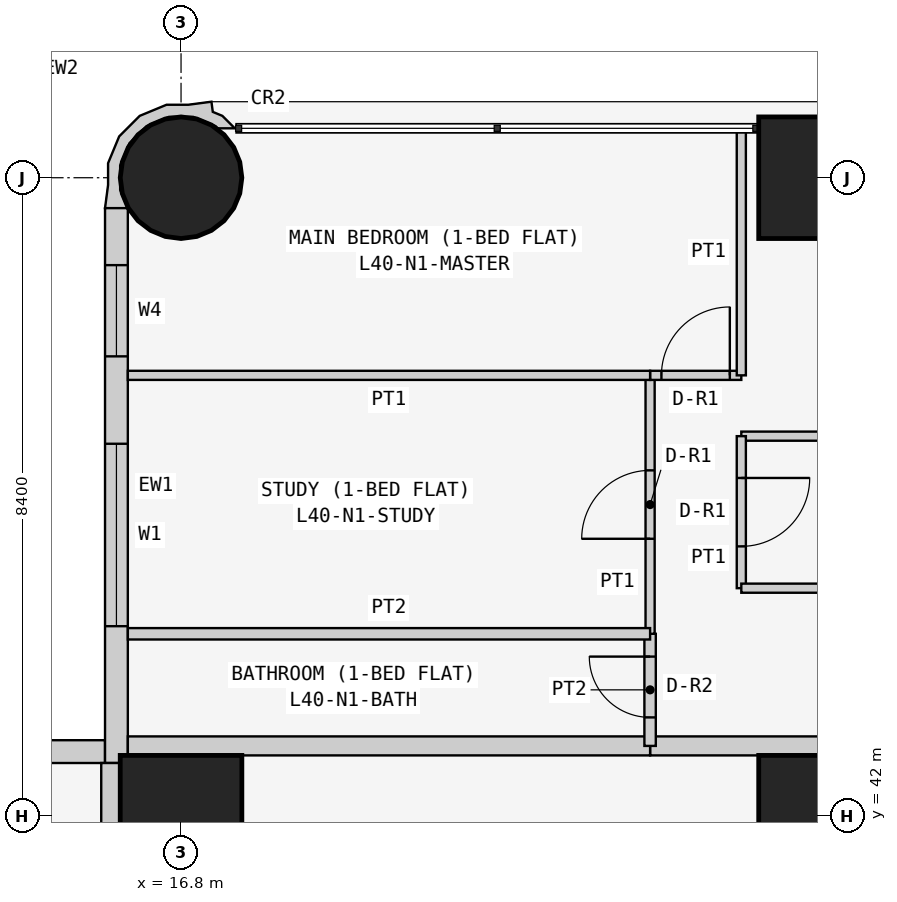
"""IFC4 building model, lengths in metres.
Left out: names, types, materials, properties, quantities, classifications, styles, units other than length and angle.
Written with IfcOpenShell. Run it as: python <this file> out.ifc"""

import sys

from ifc_helpers import new_model, si_unit, direction, frame, frame_2d, origin, origin_2d, place, context, subcontext, project, spatial, polyline, rectangle, circle, outline, extrude, element, fill, save


model = new_model("IFC4")
c1 = context("Model", 3, precision=1e-05, world=origin(), true_north=direction((0.0, 1.0)))
c2 = subcontext(c1, "Body", "Model", "MODEL_VIEW")
j1 = project(units=[si_unit("LENGTHUNIT", "METRE"), si_unit("PLANEANGLEUNIT", "RADIAN")], contexts=[c1])
p1 = place(None, origin())
s1 = spatial("IfcSite", under=j1, at=p1, CompositionType="ELEMENT")
p2 = place(p1, origin())
s2 = spatial("IfcBuilding", under=s1, at=p2, CompositionType="ELEMENT")
p3 = place(p2, frame((0.0, 0.0, 155.7)))
s3 = spatial("IfcBuildingStorey", under=s2, at=p3, CompositionType="ELEMENT", Elevation=155.7)
p4 = place(p3, frame((16.8, 42.0, 0.0), z_axis=(0.0, 0.0, 1.0), x_axis=(1.0, 0.0, 0.0)))
e1 = element("IfcColumn", 1, at=p4, inside=s3, PredefinedType="COLUMN", context=c2, shape_type="SweptSolid", body=[
    extrude(rectangle(XDim=1.6, YDim=1.6, at=origin_2d()), origin(), (0.0, 0.0, 1.0), 3.6),
])
p5 = place(p3, frame((16.8, 50.4, 0.0), z_axis=(0.0, 0.0, 1.0), x_axis=(1.0, 0.0, 0.0)))
e2 = element("IfcColumn", 2, at=p5, inside=s3, PredefinedType="COLUMN", context=c2, shape_type="SweptSolid", body=[
    extrude(circle(Radius=0.8, at=origin_2d()), origin(), (0.0, 0.0, 1.0), 3.6),
])
for number, where, z_axis, x_axis in (
    (3, (25.2, 42.0, 0.0), (0.0, 0.0, 1.0), (1.0, 0.0, 0.0)),
    (4, (25.2, 50.4, 0.0), (0.0, 0.0, 1.0), (1.0, 0.0, 0.0)),
):
    element("IfcColumn", number, at=place(p3, frame(where, z_axis=z_axis, x_axis=x_axis)), inside=s3, PredefinedType="COLUMN", context=c2, shape_type="SweptSolid", body=[
        extrude(rectangle(XDim=1.6, YDim=1.6, at=origin_2d()), origin(), (0.0, 0.0, 1.0), 3.6),
    ])
p6 = place(p3, frame((15.8, 42.85, 0.0), z_axis=(0.0, 0.0, 1.0), x_axis=(-1.0, 0.0, 0.0)))
e5 = element("IfcWall", 5, at=p6, inside=s3, PredefinedType="SOLIDWALL", context=c2, shape_type="SweptSolid", body=[
    extrude(rectangle(XDim=15.4, YDim=0.3, at=frame_2d((7.7, 0.0))), origin(), (0.0, 0.0, 1.0), 3.45),
])
p7 = place(p6, frame((1.2, 0.0, 0.9)))
e6 = element("IfcOpeningElement", 6, at=p7, cuts=e5, PredefinedType="OPENING", context=c2, shape_type="SweptSolid", body=[
    extrude(rectangle(XDim=1.8, YDim=1.5, at=frame_2d((0.9, 0.75))), frame((0.0, 0.16, 0.0), z_axis=(0.0, -1.0, 0.0), x_axis=(1.0, 0.0, 0.0)), (0.0, 0.0, 1.0), 0.32),
])
p8 = place(p6, frame((4.95, 0.0, 1.5)))
e7 = element("IfcOpeningElement", 7, at=p8, cuts=e5, PredefinedType="OPENING", context=c2, shape_type="SweptSolid", body=[
    extrude(rectangle(XDim=0.9, YDim=0.7, at=frame_2d((0.45, 0.35))), frame((0.0, 0.16, 0.0), z_axis=(0.0, -1.0, 0.0), x_axis=(1.0, 0.0, 0.0)), (0.0, 0.0, 1.0), 0.32),
])
p9 = place(p6, frame((8.5, 0.0, 0.9)))
e8 = element("IfcOpeningElement", 8, at=p9, cuts=e5, PredefinedType="OPENING", context=c2, shape_type="SweptSolid", body=[
    extrude(rectangle(XDim=1.8, YDim=1.5, at=frame_2d((0.9, 0.75))), frame((0.0, 0.16, 0.0), z_axis=(0.0, -1.0, 0.0), x_axis=(1.0, 0.0, 0.0)), (0.0, 0.0, 1.0), 0.32),
])
p10 = place(p6, frame((12.5, 0.0, 0.0)))
e9 = element("IfcOpeningElement", 9, at=p10, cuts=e5, PredefinedType="OPENING", context=c2, shape_type="SweptSolid", body=[
    extrude(rectangle(XDim=0.9, YDim=2.4, at=frame_2d((0.45, 1.2))), frame((0.0, 0.16, 0.0), z_axis=(0.0, -1.0, 0.0), x_axis=(1.0, 0.0, 0.0)), (0.0, 0.0, 1.0), 0.32),
])
p11 = place(p6, frame((13.5, 0.0, 0.9)))
e10 = element("IfcOpeningElement", 10, at=p11, cuts=e5, PredefinedType="OPENING", context=c2, shape_type="SweptSolid", body=[
    extrude(rectangle(XDim=1.2, YDim=1.5, at=frame_2d((0.6, 0.75))), frame((0.0, 0.16, 0.0), z_axis=(0.0, -1.0, 0.0), x_axis=(1.0, 0.0, 0.0)), (0.0, 0.0, 1.0), 0.32),
])
p12 = place(p3, frame((15.95, 50.0, 0.0), z_axis=(0.0, 0.0, 1.0), x_axis=(0.0, -1.0, 0.0)))
e11 = element("IfcWall", 11, at=p12, inside=s3, PredefinedType="SOLIDWALL", context=c2, shape_type="SweptSolid", body=[
    extrude(rectangle(XDim=7.3, YDim=0.3, at=frame_2d((3.65, 0.0))), origin(), (0.0, 0.0, 1.0), 3.45),
])
p13 = place(p12, frame((3.1, 0.0, 0.9)))
e12 = element("IfcOpeningElement", 12, at=p13, cuts=e11, PredefinedType="OPENING", context=c2, shape_type="SweptSolid", body=[
    extrude(rectangle(XDim=2.4, YDim=1.5, at=frame_2d((1.2, 0.75))), frame((0.0, 0.16, 0.0), z_axis=(0.0, -1.0, 0.0), x_axis=(1.0, 0.0, 0.0)), (0.0, 0.0, 1.0), 0.32),
])
p14 = place(p12, frame((0.75, 0.0, 0.9)))
e13 = element("IfcOpeningElement", 13, at=p14, cuts=e11, PredefinedType="OPENING", context=c2, shape_type="SweptSolid", body=[
    extrude(rectangle(XDim=1.2, YDim=1.5, at=frame_2d((0.6, 0.75))), frame((0.0, 0.16, 0.0), z_axis=(0.0, -1.0, 0.0), x_axis=(1.0, 0.0, 0.0)), (0.0, 0.0, 1.0), 0.32),
])
p15 = place(p3, frame((17.448, 50.995, 0.0), z_axis=(0.0, 0.0, 1.0), x_axis=(-0.343276641956, 0.93923434088, 0.0)))
e14 = element("IfcWall", 14, at=p15, inside=s3, PredefinedType="SOLIDWALL", context=c2, shape_type="SweptSolid", body=[
    extrude(outline(polyline([(0.241, 0.023), (0.333, 0.124), (0.465, 0.094), (0.532, 0.393), (0.631, 0.663), (0.614, 1.045), (0.454, 1.391), (0.172, 1.649), (-0.098, 1.748), (-0.369, 1.89), (-0.509, 1.621), (-0.491, 1.615), (-0.479, 1.609), (-0.211, 1.62), (0.088, 1.511), (0.323, 1.295), (0.457, 1.006), (0.47, 0.688), (0.361, 0.389), (0.145, 0.154), (0.108, 0.137), (0.031, -0.075), (0.241, 0.023)])), origin(), (0.0, 0.0, 1.0), 3.45),
])
p16 = place(p3, frame((22.971, 42.925, 0.0), z_axis=(0.0, 0.0, 1.0), x_axis=(1.0, 0.0, 0.0)))
e15 = element("IfcWall", 15, at=p16, inside=s3, PredefinedType="PARTITIONING", context=c2, shape_type="SweptSolid", body=[
    extrude(rectangle(XDim=6.429, YDim=0.25, at=frame_2d((3.214, 0.0))), origin(), (0.0, 0.0, 1.0), 3.45),
])
p17 = place(p16, frame((4.929, 0.0, 0.0)))
e16 = element("IfcOpeningElement", 16, at=p17, cuts=e15, PredefinedType="OPENING", context=c2, shape_type="SweptSolid", body=[
    extrude(rectangle(XDim=1.0, YDim=2.1, at=frame_2d((0.5, 1.05))), frame((0.0, 0.135, 0.0), z_axis=(0.0, -1.0, 0.0), x_axis=(1.0, 0.0, 0.0)), (0.0, 0.0, 1.0), 0.27),
])
for number, where, z_axis, x_axis in (
    (17, (16.1, 42.925, 0.0), (0.0, 0.0, 1.0), (1.0, 0.0, 0.0)),
    (18, (15.875, 35.829, 0.0), (0.0, 0.0, 1.0), (0.0, 1.0, 0.0)),
):
    element("IfcWall", number, at=place(p3, frame(where, z_axis=z_axis, x_axis=x_axis)), inside=s3, PredefinedType="PARTITIONING", context=c2, shape_type="SweptSolid", body=[
        extrude(rectangle(XDim=6.871, YDim=0.25, at=frame_2d((3.436, 0.0))), origin(), (0.0, 0.0, 1.0), 3.45),
    ])
p18 = place(p3, frame((29.4, 47.0, 0.0), z_axis=(0.0, 0.0, 1.0), x_axis=(-1.0, 0.0, 0.0)))
e19 = element("IfcWall", 19, at=p18, inside=s3, PredefinedType="PARTITIONING", context=c2, shape_type="SweptSolid", body=[
    extrude(rectangle(XDim=5.229, YDim=0.12, at=frame_2d((2.615, 0.0))), origin(), (0.0, 0.0, 1.0), 3.45),
])
p19 = place(p3, frame((24.171, 47.0, 0.0), z_axis=(0.0, 0.0, 1.0), x_axis=(0.0, -1.0, 0.0)))
e20 = element("IfcWall", 20, at=p19, inside=s3, PredefinedType="PARTITIONING", context=c2, shape_type="SweptSolid", body=[
    extrude(rectangle(XDim=2.0, YDim=0.12, at=frame_2d((1.0, 0.0))), origin(), (0.0, 0.0, 1.0), 3.45),
])
p20 = place(p19, frame((0.55, 0.0, 0.0)))
e21 = element("IfcOpeningElement", 21, at=p20, cuts=e20, PredefinedType="OPENING", context=c2, shape_type="SweptSolid", body=[
    extrude(rectangle(XDim=0.9, YDim=2.1, at=frame_2d((0.45, 1.05))), frame((0.0, 0.07, 0.0), z_axis=(0.0, -1.0, 0.0), x_axis=(1.0, 0.0, 0.0)), (0.0, 0.0, 1.0), 0.14),
])
p21 = place(p3, frame((24.171, 45.0, 0.0), z_axis=(0.0, 0.0, 1.0), x_axis=(1.0, 0.0, 0.0)))
e22 = element("IfcWall", 22, at=p21, inside=s3, PredefinedType="PARTITIONING", context=c2, shape_type="SweptSolid", body=[
    extrude(rectangle(XDim=5.229, YDim=0.12, at=frame_2d((2.615, 0.0))), origin(), (0.0, 0.0, 1.0), 3.45),
])
p22 = place(p3, frame((22.971, 42.925, 0.0), z_axis=(0.0, 0.0, 1.0), x_axis=(0.0, 1.0, 0.0)))
e23 = element("IfcWall", 23, at=p22, inside=s3, PredefinedType="PARTITIONING", context=c2, shape_type="SweptSolid", body=[
    extrude(rectangle(XDim=1.475, YDim=0.15, at=frame_2d((0.737, 0.0))), origin(), (0.0, 0.0, 1.0), 3.45),
])
p23 = place(p22, frame((0.375, 0.0, 0.0)))
e24 = element("IfcOpeningElement", 24, at=p23, cuts=e23, PredefinedType="OPENING", context=c2, shape_type="SweptSolid", body=[
    extrude(rectangle(XDim=0.8, YDim=2.1, at=frame_2d((0.4, 1.05))), frame((0.0, 0.085, 0.0), z_axis=(0.0, -1.0, 0.0), x_axis=(1.0, 0.0, 0.0)), (0.0, 0.0, 1.0), 0.17),
])
p24 = place(p3, frame((22.971, 44.4, 0.0), z_axis=(0.0, 0.0, 1.0), x_axis=(0.0, 1.0, 0.0)))
e25 = element("IfcWall", 25, at=p24, inside=s3, PredefinedType="PARTITIONING", context=c2, shape_type="SweptSolid", body=[
    extrude(rectangle(XDim=3.4, YDim=0.12, at=frame_2d((1.7, 0.0))), origin(), (0.0, 0.0, 1.0), 3.45),
])
p25 = place(p24, frame((1.25, 0.0, 0.0)))
e26 = element("IfcOpeningElement", 26, at=p25, cuts=e25, PredefinedType="OPENING", context=c2, shape_type="SweptSolid", body=[
    extrude(rectangle(XDim=0.9, YDim=2.1, at=frame_2d((0.45, 1.05))), frame((0.0, 0.07, 0.0), z_axis=(0.0, -1.0, 0.0), x_axis=(1.0, 0.0, 0.0)), (0.0, 0.0, 1.0), 0.14),
])
p26 = place(p3, frame((22.971, 47.8, 0.0), z_axis=(0.0, 0.0, 1.0), x_axis=(1.0, 0.0, 0.0)))
e27 = element("IfcWall", 27, at=p26, inside=s3, PredefinedType="PARTITIONING", context=c2, shape_type="SweptSolid", body=[
    extrude(rectangle(XDim=1.2, YDim=0.12, at=frame_2d((0.6, 0.0))), origin(), (0.0, 0.0, 1.0), 3.45),
])
p27 = place(p26, frame((0.149, 0.0, 0.0)))
e28 = element("IfcOpeningElement", 28, at=p27, cuts=e27, PredefinedType="OPENING", context=c2, shape_type="SweptSolid", body=[
    extrude(rectangle(XDim=0.9, YDim=2.1, at=frame_2d((0.45, 1.05))), frame((0.0, 0.07, 0.0), z_axis=(0.0, -1.0, 0.0), x_axis=(1.0, 0.0, 0.0)), (0.0, 0.0, 1.0), 0.14),
])
p28 = place(p3, frame((24.171, 47.8, 0.0), z_axis=(0.0, 0.0, 1.0), x_axis=(0.0, 1.0, 0.0)))
e29 = element("IfcWall", 29, at=p28, inside=s3, PredefinedType="PARTITIONING", context=c2, shape_type="SweptSolid", body=[
    extrude(rectangle(XDim=3.25, YDim=0.12, at=frame_2d((1.625, 0.0))), origin(), (0.0, 0.0, 1.0), 3.45),
])
p29 = place(p3, frame((22.971, 44.4, 0.0), z_axis=(0.0, 0.0, 1.0), x_axis=(-1.0, 0.0, 0.0)))
e30 = element("IfcWall", 30, at=p29, inside=s3, PredefinedType="PARTITIONING", context=c2, shape_type="SweptSolid", body=[
    extrude(rectangle(XDim=6.871, YDim=0.15, at=frame_2d((3.436, 0.0))), origin(), (0.0, 0.0, 1.0), 3.45),
])
p30 = place(p3, frame((22.971, 47.8, 0.0), z_axis=(0.0, 0.0, 1.0), x_axis=(-1.0, 0.0, 0.0)))
e31 = element("IfcWall", 31, at=p30, inside=s3, PredefinedType="PARTITIONING", context=c2, shape_type="SweptSolid", body=[
    extrude(rectangle(XDim=6.871, YDim=0.12, at=frame_2d((3.436, 0.0))), origin(), (0.0, 0.0, 1.0), 3.45),
])
p31 = place(p13, origin())
e32 = element("IfcWindow", 32, at=p31, inside=s3, PartitioningType="SINGLE_PANEL", PredefinedType="WINDOW", context=c2, shape_type="SweptSolid", body=[
    extrude(rectangle(XDim=2.4, YDim=1.5, at=frame_2d((1.2, 0.75))), frame((0.0, 0.03, 0.0), z_axis=(0.0, -1.0, 0.0), x_axis=(1.0, 0.0, 0.0)), (0.0, 0.0, 1.0), 0.06),
])
fill(e12, e32)
p32 = place(p14, origin())
e33 = element("IfcWindow", 33, at=p32, inside=s3, PartitioningType="SINGLE_PANEL", PredefinedType="WINDOW", context=c2, shape_type="SweptSolid", body=[
    extrude(rectangle(XDim=1.2, YDim=1.5, at=frame_2d((0.6, 0.75))), frame((0.0, 0.03, 0.0), z_axis=(0.0, -1.0, 0.0), x_axis=(1.0, 0.0, 0.0)), (0.0, 0.0, 1.0), 0.06),
])
fill(e13, e33)
p33 = place(p20, origin())
e34 = element("IfcDoor", 34, at=p33, inside=s3, OperationType="SINGLE_SWING_LEFT", PredefinedType="DOOR", context=c2, shape_type="SweptSolid", body=[
    extrude(rectangle(XDim=0.9, YDim=2.1, at=frame_2d((0.45, 1.05))), frame((0.0, 0.025, 0.0), z_axis=(0.0, -1.0, 0.0), x_axis=(1.0, 0.0, 0.0)), (0.0, 0.0, 1.0), 0.05),
])
fill(e21, e34)
p34 = place(p23, origin())
e35 = element("IfcDoor", 35, at=p34, inside=s3, OperationType="SINGLE_SWING_RIGHT", PredefinedType="DOOR", context=c2, shape_type="SweptSolid", body=[
    extrude(rectangle(XDim=0.8, YDim=2.1, at=frame_2d((0.4, 1.05))), frame((0.0, 0.025, 0.0), z_axis=(0.0, -1.0, 0.0), x_axis=(1.0, 0.0, 0.0)), (0.0, 0.0, 1.0), 0.05),
])
fill(e24, e35)
p35 = place(p25, origin())
e36 = element("IfcDoor", 36, at=p35, inside=s3, OperationType="SINGLE_SWING_LEFT", PredefinedType="DOOR", context=c2, shape_type="SweptSolid", body=[
    extrude(rectangle(XDim=0.9, YDim=2.1, at=frame_2d((0.45, 1.05))), frame((0.0, 0.025, 0.0), z_axis=(0.0, -1.0, 0.0), x_axis=(1.0, 0.0, 0.0)), (0.0, 0.0, 1.0), 0.05),
])
fill(e26, e36)
p36 = place(p27, origin())
e37 = element("IfcDoor", 37, at=p36, inside=s3, OperationType="SINGLE_SWING_RIGHT", PredefinedType="DOOR", context=c2, shape_type="SweptSolid", body=[
    extrude(rectangle(XDim=0.9, YDim=2.1, at=frame_2d((0.45, 1.05))), frame((0.0, 0.025, 0.0), z_axis=(0.0, -1.0, 0.0), x_axis=(1.0, 0.0, 0.0)), (0.0, 0.0, 1.0), 0.05),
])
fill(e28, e37)
save(model, sys.argv[1])
